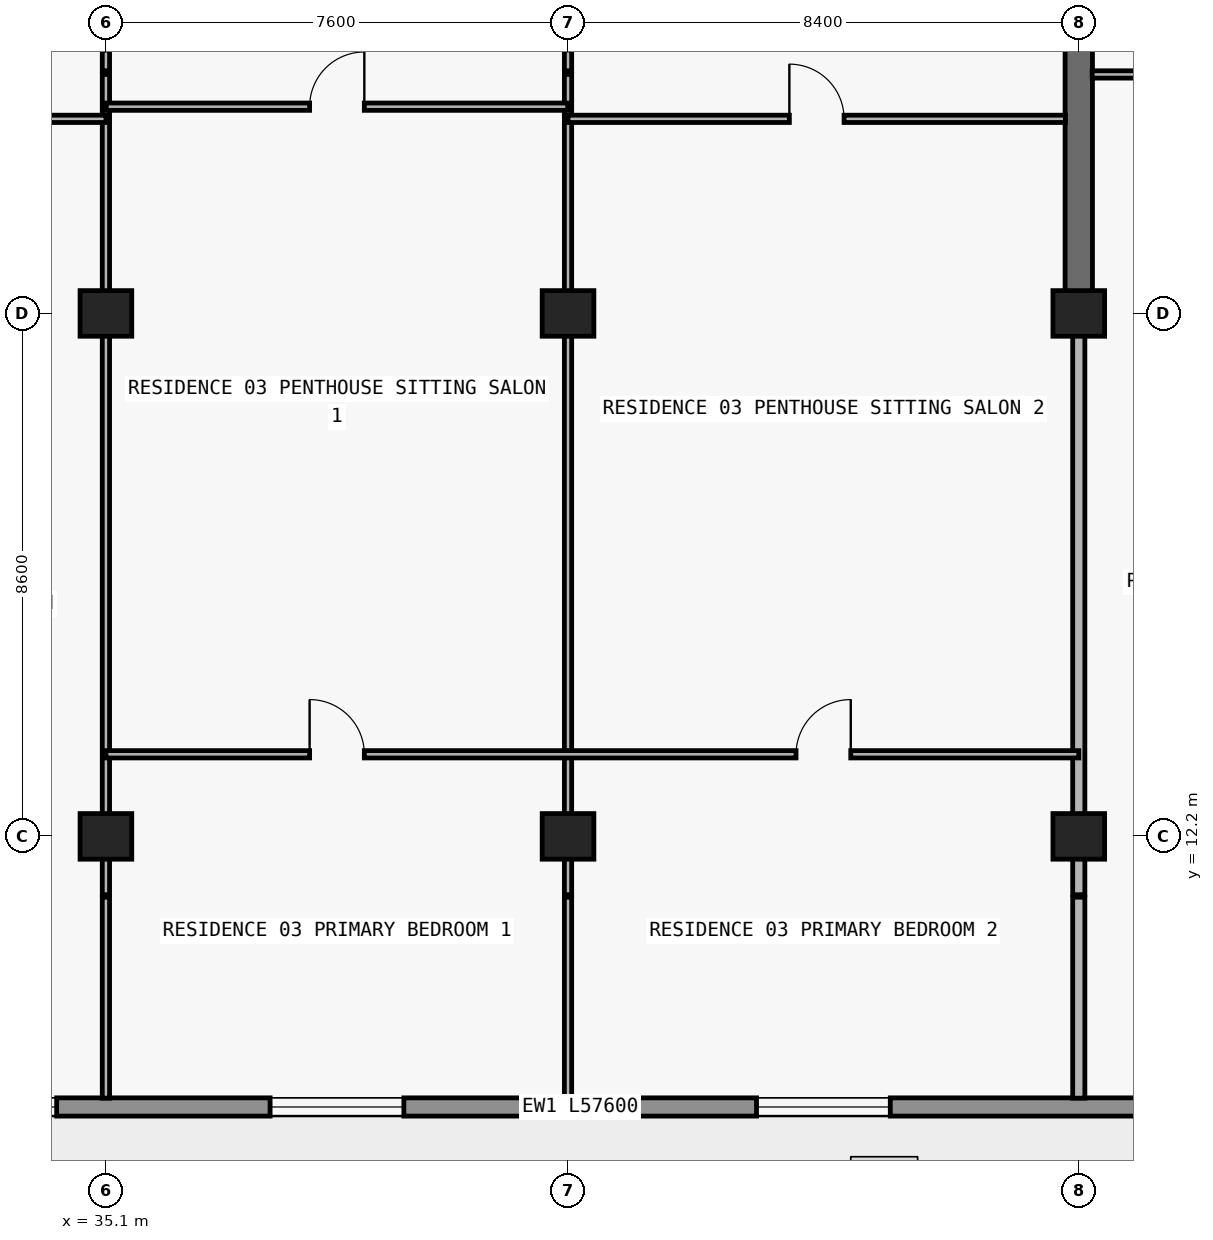
"""IFC4 building model, lengths in metres.
Left out: names, types, materials, properties, quantities, classifications, styles, units other than length and angle.
Written with IfcOpenShell. Run it as: python <this file> out.ifc"""

import sys

from ifc_helpers import new_model, si_unit, direction, frame, frame_2d, origin, origin_2d, place, context, subcontext, project, spatial, rectangle, extrude, element, fill, save


model = new_model("IFC4")
c1 = context("Model", 3, precision=1e-05, world=origin(), true_north=direction((0.0, 1.0)))
c2 = subcontext(c1, "Body", "Model", "MODEL_VIEW")
j1 = project(units=[si_unit("LENGTHUNIT", "METRE"), si_unit("PLANEANGLEUNIT", "RADIAN")], contexts=[c1])
p1 = place(None, origin())
s1 = spatial("IfcSite", under=j1, at=p1, CompositionType="ELEMENT")
p2 = place(p1, origin())
s2 = spatial("IfcBuilding", under=s1, at=p2, CompositionType="ELEMENT")
p3 = place(p2, frame((0.0, 0.0, 180.3)))
s3 = spatial("IfcBuildingStorey", under=s2, at=p3, CompositionType="ELEMENT", Elevation=180.3)
for number, where, z_axis, x_axis in (
    (1, (35.1, 12.2, 0.0), (0.0, 0.0, 1.0), (1.0, 0.0, 0.0)),
    (2, (42.7, 12.2, 0.0), (0.0, 0.0, 1.0), (1.0, 0.0, 0.0)),
    (3, (51.1, 12.2, 0.0), (0.0, 0.0, 1.0), (1.0, 0.0, 0.0)),
    (4, (35.1, 20.8, 0.0), (0.0, 0.0, 1.0), (1.0, 0.0, 0.0)),
    (5, (42.7, 20.8, 0.0), (0.0, 0.0, 1.0), (1.0, 0.0, 0.0)),
    (6, (51.1, 20.8, 0.0), (0.0, 0.0, 1.0), (1.0, 0.0, 0.0)),
):
    element("IfcColumn", number, at=place(p3, frame(where, z_axis=z_axis, x_axis=x_axis)), inside=s3, PredefinedType="COLUMN", context=c2, shape_type="SweptSolid", body=[
        extrude(rectangle(XDim=0.85, YDim=0.75, at=origin_2d()), origin(), (0.0, 0.0, 1.0), 3.0),
    ])
p4 = place(p3, frame((51.1, 20.8, 0.0), z_axis=(0.0, 0.0, 1.0), x_axis=(0.0, 1.0, 0.0)))
e7 = element("IfcWall", 7, at=p4, inside=s3, PredefinedType="SHEAR", context=c2, shape_type="SweptSolid", body=[
    extrude(rectangle(XDim=8.6, YDim=0.45, at=frame_2d((4.3, 0.0))), origin(), (0.0, 0.0, 1.0), 3.0),
])
p5 = place(p3, frame((67.7, 7.75, 0.0), z_axis=(0.0, 0.0, 1.0), x_axis=(-1.0, 0.0, 0.0)))
e8 = element("IfcWall", 8, at=p5, inside=s3, PredefinedType="STANDARD", context=c2, shape_type="SweptSolid", body=[
    extrude(rectangle(XDim=57.6, YDim=0.3, at=frame_2d((28.8, 0.0))), origin(), (0.0, 0.0, 1.0), 3.0),
])
p6 = place(p5, frame((54.673, 0.0, 0.0)))
e9 = element("IfcOpeningElement", 9, at=p6, cuts=e8, PredefinedType="OPENING", context=c2, shape_type="SweptSolid", body=[
    extrude(rectangle(XDim=2.0, YDim=2.3, at=frame_2d((1.0, 1.15))), frame((0.0, 0.16, 0.0), z_axis=(0.0, -1.0, 0.0), x_axis=(1.0, 0.0, 0.0)), (0.0, 0.0, 1.0), 0.32),
])
p7 = place(p5, frame((50.473, 0.0, 0.85)))
e10 = element("IfcOpeningElement", 10, at=p7, cuts=e8, PredefinedType="OPENING", context=c2, shape_type="SweptSolid", body=[
    extrude(rectangle(XDim=2.2, YDim=1.55, at=frame_2d((1.1, 0.775))), frame((0.0, 0.16, 0.0), z_axis=(0.0, -1.0, 0.0), x_axis=(1.0, 0.0, 0.0)), (0.0, 0.0, 1.0), 0.32),
])
p8 = place(p5, frame((46.09, 0.0, 0.0)))
e11 = element("IfcOpeningElement", 11, at=p8, cuts=e8, PredefinedType="OPENING", context=c2, shape_type="SweptSolid", body=[
    extrude(rectangle(XDim=2.0, YDim=2.3, at=frame_2d((1.0, 1.15))), frame((0.0, 0.16, 0.0), z_axis=(0.0, -1.0, 0.0), x_axis=(1.0, 0.0, 0.0)), (0.0, 0.0, 1.0), 0.32),
])
p9 = place(p5, frame((41.99, 0.0, 0.85)))
e12 = element("IfcOpeningElement", 12, at=p9, cuts=e8, PredefinedType="OPENING", context=c2, shape_type="SweptSolid", body=[
    extrude(rectangle(XDim=1.8, YDim=1.55, at=frame_2d((0.9, 0.775))), frame((0.0, 0.16, 0.0), z_axis=(0.0, -1.0, 0.0), x_axis=(1.0, 0.0, 0.0)), (0.0, 0.0, 1.0), 0.32),
])
p10 = place(p5, frame((38.09, 0.0, 0.0)))
e13 = element("IfcOpeningElement", 13, at=p10, cuts=e8, PredefinedType="OPENING", context=c2, shape_type="SweptSolid", body=[
    extrude(rectangle(XDim=2.0, YDim=2.3, at=frame_2d((1.0, 1.15))), frame((0.0, 0.16, 0.0), z_axis=(0.0, -1.0, 0.0), x_axis=(1.0, 0.0, 0.0)), (0.0, 0.0, 1.0), 0.32),
])
p11 = place(p5, frame((33.41, 0.0, 0.65)))
e14 = element("IfcOpeningElement", 14, at=p11, cuts=e8, PredefinedType="OPENING", context=c2, shape_type="SweptSolid", body=[
    extrude(rectangle(XDim=2.6, YDim=1.85, at=frame_2d((1.3, 0.925))), frame((0.0, 0.16, 0.0), z_axis=(0.0, -1.0, 0.0), x_axis=(1.0, 0.0, 0.0)), (0.0, 0.0, 1.0), 0.32),
])
p12 = place(p5, frame((27.7, 0.0, 0.85)))
e15 = element("IfcOpeningElement", 15, at=p12, cuts=e8, PredefinedType="OPENING", context=c2, shape_type="SweptSolid", body=[
    extrude(rectangle(XDim=2.2, YDim=1.55, at=frame_2d((1.1, 0.775))), frame((0.0, 0.16, 0.0), z_axis=(0.0, -1.0, 0.0), x_axis=(1.0, 0.0, 0.0)), (0.0, 0.0, 1.0), 0.32),
])
p13 = place(p5, frame((19.7, 0.0, 0.85)))
e16 = element("IfcOpeningElement", 16, at=p13, cuts=e8, PredefinedType="OPENING", context=c2, shape_type="SweptSolid", body=[
    extrude(rectangle(XDim=2.2, YDim=1.55, at=frame_2d((1.1, 0.775))), frame((0.0, 0.16, 0.0), z_axis=(0.0, -1.0, 0.0), x_axis=(1.0, 0.0, 0.0)), (0.0, 0.0, 1.0), 0.32),
])
p14 = place(p5, frame((13.29, 0.0, 0.0)))
e17 = element("IfcOpeningElement", 17, at=p14, cuts=e8, PredefinedType="OPENING", context=c2, shape_type="SweptSolid", body=[
    extrude(rectangle(XDim=2.0, YDim=2.3, at=frame_2d((1.0, 1.15))), frame((0.0, 0.16, 0.0), z_axis=(0.0, -1.0, 0.0), x_axis=(1.0, 0.0, 0.0)), (0.0, 0.0, 1.0), 0.32),
])
p15 = place(p5, frame((9.19, 0.0, 0.85)))
e18 = element("IfcOpeningElement", 18, at=p15, cuts=e8, PredefinedType="OPENING", context=c2, shape_type="SweptSolid", body=[
    extrude(rectangle(XDim=1.8, YDim=1.55, at=frame_2d((0.9, 0.775))), frame((0.0, 0.16, 0.0), z_axis=(0.0, -1.0, 0.0), x_axis=(1.0, 0.0, 0.0)), (0.0, 0.0, 1.0), 0.32),
])
p16 = place(p5, frame((5.273, 0.0, 0.0)))
e19 = element("IfcOpeningElement", 19, at=p16, cuts=e8, PredefinedType="OPENING", context=c2, shape_type="SweptSolid", body=[
    extrude(rectangle(XDim=2.0, YDim=2.3, at=frame_2d((1.0, 1.15))), frame((0.0, 0.16, 0.0), z_axis=(0.0, -1.0, 0.0), x_axis=(1.0, 0.0, 0.0)), (0.0, 0.0, 1.0), 0.32),
])
p17 = place(p5, frame((1.073, 0.0, 0.85)))
e20 = element("IfcOpeningElement", 20, at=p17, cuts=e8, PredefinedType="OPENING", context=c2, shape_type="SweptSolid", body=[
    extrude(rectangle(XDim=2.2, YDim=1.55, at=frame_2d((1.1, 0.775))), frame((0.0, 0.16, 0.0), z_axis=(0.0, -1.0, 0.0), x_axis=(1.0, 0.0, 0.0)), (0.0, 0.0, 1.0), 0.32),
])
p18 = place(p3, frame((35.1, 7.895, 0.0), z_axis=(0.0, 0.0, 1.0), x_axis=(0.0, 1.0, 0.0)))
e21 = element("IfcWall", 21, at=p18, inside=s3, PredefinedType="PARTITIONING", context=c2, shape_type="SweptSolid", body=[
    extrude(rectangle(XDim=3.305, YDim=0.12, at=frame_2d((1.652, 0.0))), origin(), (0.0, 0.0, 1.0), 3.0),
])
p19 = place(p3, frame((35.1, 11.24, 0.0), z_axis=(0.0, 0.0, 1.0), x_axis=(0.0, 1.0, 0.0)))
e22 = element("IfcWall", 22, at=p19, inside=s3, PredefinedType="PARTITIONING", context=c2, shape_type="SweptSolid", body=[
    extrude(rectangle(XDim=13.49, YDim=0.12, at=frame_2d((6.745, 0.0))), origin(), (0.0, 0.0, 1.0), 2.213),
])
p20 = place(p3, frame((35.1, 24.79, 0.0), z_axis=(0.0, 0.0, 1.0), x_axis=(0.0, 1.0, 0.0)))
e23 = element("IfcWall", 23, at=p20, inside=s3, PredefinedType="PARTITIONING", context=c2, shape_type="SweptSolid", body=[
    extrude(rectangle(XDim=0.34, YDim=0.12, at=frame_2d((0.17, 0.0))), origin(), (0.0, 0.0, 1.0), 2.213),
])
p21 = place(p3, frame((42.7, 7.895, 0.0), z_axis=(0.0, 0.0, 1.0), x_axis=(0.0, 1.0, 0.0)))
e24 = element("IfcWall", 24, at=p21, inside=s3, PredefinedType="PARTITIONING", context=c2, shape_type="SweptSolid", body=[
    extrude(rectangle(XDim=3.305, YDim=0.12, at=frame_2d((1.652, 0.0))), origin(), (0.0, 0.0, 1.0), 3.0),
])
p22 = place(p3, frame((42.7, 11.24, 0.0), z_axis=(0.0, 0.0, 1.0), x_axis=(0.0, 1.0, 0.0)))
e25 = element("IfcWall", 25, at=p22, inside=s3, PredefinedType="PARTITIONING", context=c2, shape_type="SweptSolid", body=[
    extrude(rectangle(XDim=13.49, YDim=0.12, at=frame_2d((6.745, 0.0))), origin(), (0.0, 0.0, 1.0), 2.213),
])
p23 = place(p3, frame((42.7, 24.79, 0.0), z_axis=(0.0, 0.0, 1.0), x_axis=(0.0, 1.0, 0.0)))
e26 = element("IfcWall", 26, at=p23, inside=s3, PredefinedType="PARTITIONING", context=c2, shape_type="SweptSolid", body=[
    extrude(rectangle(XDim=0.34, YDim=0.12, at=frame_2d((0.17, 0.0))), origin(), (0.0, 0.0, 1.0), 2.213),
])
p24 = place(p3, frame((51.1, 7.895, 0.0), z_axis=(0.0, 0.0, 1.0), x_axis=(0.0, 1.0, 0.0)))
e27 = element("IfcWall", 27, at=p24, inside=s3, PredefinedType="PARTITIONING", context=c2, shape_type="SweptSolid", body=[
    extrude(rectangle(XDim=3.305, YDim=0.2, at=frame_2d((1.652, 0.0))), origin(), (0.0, 0.0, 1.0), 3.0),
])
p25 = place(p3, frame((51.1, 11.24, 0.0), z_axis=(0.0, 0.0, 1.0), x_axis=(0.0, 1.0, 0.0)))
e28 = element("IfcWall", 28, at=p25, inside=s3, PredefinedType="PARTITIONING", context=c2, shape_type="SweptSolid", body=[
    extrude(rectangle(XDim=9.555, YDim=0.2, at=frame_2d((4.777, 0.0))), origin(), (0.0, 0.0, 1.0), 2.213),
])
p26 = place(p3, frame((35.1, 13.55, 0.0), z_axis=(0.0, 0.0, 1.0), x_axis=(1.0, 0.0, 0.0)))
e29 = element("IfcWall", 29, at=p26, inside=s3, PredefinedType="PARTITIONING", context=c2, shape_type="SweptSolid", body=[
    extrude(rectangle(XDim=16.0, YDim=0.12, at=frame_2d((8.0, 0.0))), origin(), (0.0, 0.0, 1.0), 3.0),
])
p27 = place(p26, frame((3.35, 0.0, 0.0)))
e30 = element("IfcOpeningElement", 30, at=p27, cuts=e29, PredefinedType="OPENING", context=c2, shape_type="SweptSolid", body=[
    extrude(rectangle(XDim=0.9, YDim=2.15, at=frame_2d((0.45, 1.075))), frame((0.0, 0.07, 0.0), z_axis=(0.0, -1.0, 0.0), x_axis=(1.0, 0.0, 0.0)), (0.0, 0.0, 1.0), 0.14),
])
p28 = place(p26, frame((11.35, 0.0, 0.0)))
e31 = element("IfcOpeningElement", 31, at=p28, cuts=e29, PredefinedType="OPENING", context=c2, shape_type="SweptSolid", body=[
    extrude(rectangle(XDim=0.9, YDim=2.15, at=frame_2d((0.45, 1.075))), frame((0.0, 0.07, 0.0), z_axis=(0.0, -1.0, 0.0), x_axis=(1.0, 0.0, 0.0)), (0.0, 0.0, 1.0), 0.14),
])
p29 = place(p3, frame((26.92, 24.0, 0.0), z_axis=(0.0, 0.0, 1.0), x_axis=(1.0, 0.0, 0.0)))
e32 = element("IfcWall", 32, at=p29, inside=s3, PredefinedType="PARTITIONING", context=c2, shape_type="SweptSolid", body=[
    extrude(rectangle(XDim=8.18, YDim=0.12, at=frame_2d((4.09, 0.0))), origin(), (0.0, 0.0, 1.0), 3.0),
])
p30 = place(p29, frame((1.33, 0.0, 0.0)))
e33 = element("IfcOpeningElement", 33, at=p30, cuts=e32, PredefinedType="OPENING", context=c2, shape_type="SweptSolid", body=[
    extrude(rectangle(XDim=0.9, YDim=2.15, at=frame_2d((0.45, 1.075))), frame((0.0, 0.07, 0.0), z_axis=(0.0, -1.0, 0.0), x_axis=(1.0, 0.0, 0.0)), (0.0, 0.0, 1.0), 0.14),
])
p31 = place(p3, frame((42.7, 24.0, 0.0), z_axis=(0.0, 0.0, 1.0), x_axis=(1.0, 0.0, 0.0)))
e34 = element("IfcWall", 34, at=p31, inside=s3, PredefinedType="PARTITIONING", context=c2, shape_type="SweptSolid", body=[
    extrude(rectangle(XDim=8.18, YDim=0.12, at=frame_2d((4.09, 0.0))), origin(), (0.0, 0.0, 1.0), 3.0),
])
p32 = place(p31, frame((3.64, 0.0, 0.0)))
e35 = element("IfcOpeningElement", 35, at=p32, cuts=e34, PredefinedType="OPENING", context=c2, shape_type="SweptSolid", body=[
    extrude(rectangle(XDim=0.9, YDim=2.15, at=frame_2d((0.45, 1.075))), frame((0.0, 0.07, 0.0), z_axis=(0.0, -1.0, 0.0), x_axis=(1.0, 0.0, 0.0)), (0.0, 0.0, 1.0), 0.14),
])
p33 = place(p3, frame((35.105, 24.2, 0.0), z_axis=(0.0, 0.0, 1.0), x_axis=(1.0, 0.0, 0.0)))
e36 = element("IfcWall", 36, at=p33, inside=s3, PredefinedType="PARTITIONING", context=c2, shape_type="SweptSolid", body=[
    extrude(rectangle(XDim=7.59, YDim=0.12, at=frame_2d((3.795, 0.0))), origin(), (0.0, 0.0, 1.0), 3.0),
])
p34 = place(p33, frame((3.345, 0.0, 0.0)))
e37 = element("IfcOpeningElement", 37, at=p34, cuts=e36, PredefinedType="OPENING", context=c2, shape_type="SweptSolid", body=[
    extrude(rectangle(XDim=0.9, YDim=2.15, at=frame_2d((0.45, 1.075))), frame((0.0, 0.07, 0.0), z_axis=(0.0, -1.0, 0.0), x_axis=(1.0, 0.0, 0.0)), (0.0, 0.0, 1.0), 0.14),
])
p35 = place(p3, frame((51.32, 24.73, 0.0), z_axis=(0.0, 0.0, 1.0), x_axis=(1.0, 0.0, 0.0)))
e38 = element("IfcWall", 38, at=p35, inside=s3, PredefinedType="PARTITIONING", context=c2, shape_type="SweptSolid", body=[
    extrude(rectangle(XDim=8.18, YDim=0.12, at=frame_2d((4.09, 0.0))), origin(), (0.0, 0.0, 1.0), 3.0),
])
p36 = place(p35, frame((1.583, 0.0, 0.0)))
e39 = element("IfcOpeningElement", 39, at=p36, cuts=e38, PredefinedType="OPENING", context=c2, shape_type="SweptSolid", body=[
    extrude(rectangle(XDim=0.9, YDim=2.15, at=frame_2d((0.45, 1.075))), frame((0.0, 0.07, 0.0), z_axis=(0.0, -1.0, 0.0), x_axis=(1.0, 0.0, 0.0)), (0.0, 0.0, 1.0), 0.14),
])
p37 = place(p35, frame((5.84, 0.0, 0.0)))
e40 = element("IfcOpeningElement", 40, at=p37, cuts=e38, PredefinedType="OPENING", context=c2, shape_type="SweptSolid", body=[
    extrude(rectangle(XDim=0.9, YDim=2.15, at=frame_2d((0.45, 1.075))), frame((0.0, 0.07, 0.0), z_axis=(0.0, -1.0, 0.0), x_axis=(1.0, 0.0, 0.0)), (0.0, 0.0, 1.0), 0.14),
])
p38 = place(p11, origin())
e41 = element("IfcWindow", 41, at=p38, inside=s3, PartitioningType="SINGLE_PANEL", PredefinedType="WINDOW", context=c2, shape_type="SweptSolid", body=[
    extrude(rectangle(XDim=2.6, YDim=1.85, at=frame_2d((1.3, 0.925))), frame((0.0, 0.03, 0.0), z_axis=(0.0, -1.0, 0.0), x_axis=(1.0, 0.0, 0.0)), (0.0, 0.0, 1.0), 0.06),
])
fill(e14, e41)
p39 = place(p12, origin())
e42 = element("IfcWindow", 42, at=p39, inside=s3, PartitioningType="SINGLE_PANEL", PredefinedType="WINDOW", context=c2, shape_type="SweptSolid", body=[
    extrude(rectangle(XDim=2.2, YDim=1.55, at=frame_2d((1.1, 0.775))), frame((0.0, 0.03, 0.0), z_axis=(0.0, -1.0, 0.0), x_axis=(1.0, 0.0, 0.0)), (0.0, 0.0, 1.0), 0.06),
])
fill(e15, e42)
p40 = place(p13, origin())
e43 = element("IfcWindow", 43, at=p40, inside=s3, PartitioningType="SINGLE_PANEL", PredefinedType="WINDOW", context=c2, shape_type="SweptSolid", body=[
    extrude(rectangle(XDim=2.2, YDim=1.55, at=frame_2d((1.1, 0.775))), frame((0.0, 0.03, 0.0), z_axis=(0.0, -1.0, 0.0), x_axis=(1.0, 0.0, 0.0)), (0.0, 0.0, 1.0), 0.06),
])
fill(e16, e43)
p41 = place(p34, origin())
e44 = element("IfcDoor", 44, at=p41, inside=s3, OperationType="SINGLE_SWING_RIGHT", PredefinedType="DOOR", context=c2, shape_type="SweptSolid", body=[
    extrude(rectangle(XDim=0.9, YDim=2.15, at=frame_2d((0.45, 1.075))), frame((0.0, 0.025, 0.0), z_axis=(0.0, -1.0, 0.0), x_axis=(1.0, 0.0, 0.0)), (0.0, 0.0, 1.0), 0.05),
])
fill(e37, e44)
p42 = place(p27, origin())
e45 = element("IfcDoor", 45, at=p42, inside=s3, OperationType="SINGLE_SWING_LEFT", PredefinedType="DOOR", context=c2, shape_type="SweptSolid", body=[
    extrude(rectangle(XDim=0.9, YDim=2.15, at=frame_2d((0.45, 1.075))), frame((0.0, 0.025, 0.0), z_axis=(0.0, -1.0, 0.0), x_axis=(1.0, 0.0, 0.0)), (0.0, 0.0, 1.0), 0.05),
])
fill(e30, e45)
p43 = place(p32, origin())
e46 = element("IfcDoor", 46, at=p43, inside=s3, OperationType="SINGLE_SWING_LEFT", PredefinedType="DOOR", context=c2, shape_type="SweptSolid", body=[
    extrude(rectangle(XDim=0.9, YDim=2.15, at=frame_2d((0.45, 1.075))), frame((0.0, 0.025, 0.0), z_axis=(0.0, -1.0, 0.0), x_axis=(1.0, 0.0, 0.0)), (0.0, 0.0, 1.0), 0.05),
])
fill(e35, e46)
p44 = place(p28, origin())
e47 = element("IfcDoor", 47, at=p44, inside=s3, OperationType="SINGLE_SWING_RIGHT", PredefinedType="DOOR", context=c2, shape_type="SweptSolid", body=[
    extrude(rectangle(XDim=0.9, YDim=2.15, at=frame_2d((0.45, 1.075))), frame((0.0, 0.025, 0.0), z_axis=(0.0, -1.0, 0.0), x_axis=(1.0, 0.0, 0.0)), (0.0, 0.0, 1.0), 0.05),
])
fill(e31, e47)
save(model, sys.argv[1])
